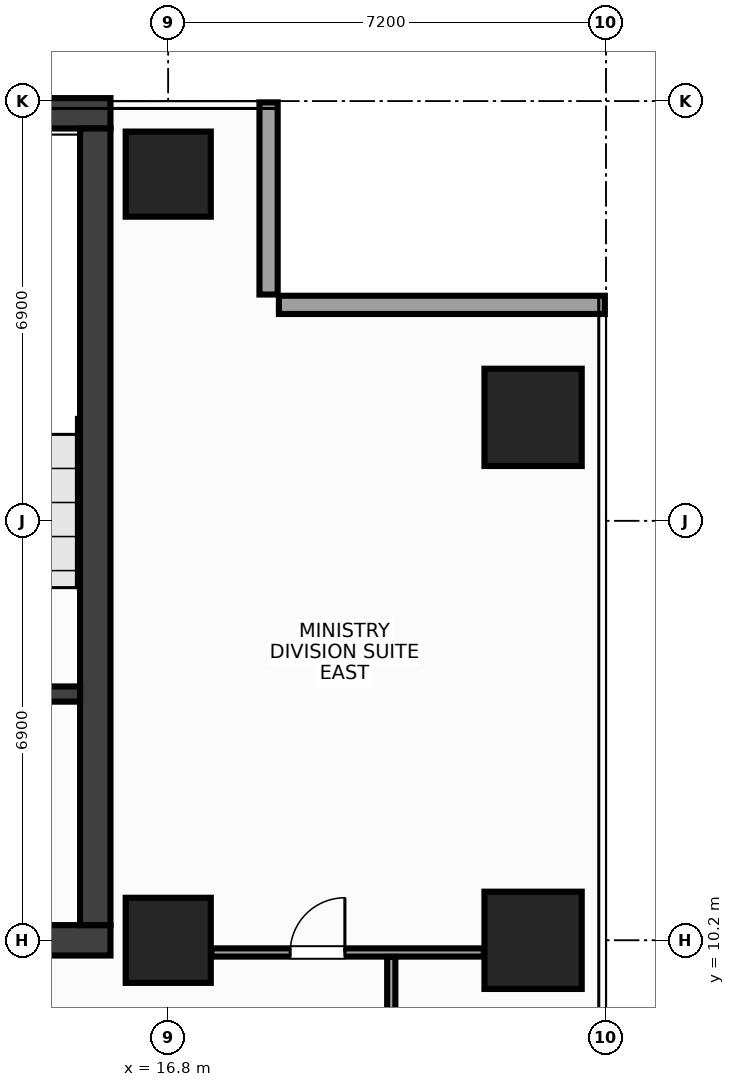
"""IFC4 building model, lengths in metres.
Left out: names, types, materials, properties, quantities, classifications, styles, units other than length and angle.
Written with IfcOpenShell. Run it as: python <this file> out.ifc"""

import sys

from ifc_helpers import new_model, si_unit, direction, frame, frame_2d, origin, origin_2d, place, context, subcontext, project, spatial, rectangle, extrude, source, transform, mapped, element, fill, save


model = new_model("IFC4")
c1 = context("Model", 3, precision=1e-05, world=origin(), true_north=direction((0.0, 1.0)))
c2 = subcontext(c1, "Body", "Model", "MODEL_VIEW")
j1 = project(units=[si_unit("LENGTHUNIT", "METRE"), si_unit("PLANEANGLEUNIT", "RADIAN")], contexts=[c1])
p1 = place(None, origin())
s1 = spatial("IfcSite", under=j1, at=p1, CompositionType="ELEMENT")
p2 = place(p1, origin())
s2 = spatial("IfcBuilding", under=s1, at=p2, CompositionType="ELEMENT")
p3 = place(p2, frame((0.0, 0.0, 196.4)))
s3 = spatial("IfcBuildingStorey", under=s2, at=p3, CompositionType="ELEMENT", Elevation=196.4)
m1 = source(origin(), c2, "Body", "SweptSolid", [
    extrude(rectangle(XDim=31.7, YDim=0.5, at=frame_2d((15.85, 0.0))), origin(), (0.0, 0.0, 1.0), 3.6),
])
p4 = place(p3, frame((-15.85, 23.8, 0.0), z_axis=(0.0, 0.0, 1.0), x_axis=(1.0, 0.0, 0.0)))
e1 = element("IfcWall", 1, at=p4, inside=s3, PredefinedType="SHEAR", context=c2, shape_type="MappedRepresentation", body=[
    mapped(m1, transform((0.0, 0.0, 0.0), x_axis=(1.0, 0.0, 0.0), y_axis=(0.0, 1.0, 0.0), z_axis=(0.0, 0.0, 1.0), scale=1.0)),
])
p5 = place(p3, frame((-15.85, 10.2, 0.0), z_axis=(0.0, 0.0, 1.0), x_axis=(1.0, 0.0, 0.0)))
e2 = element("IfcWall", 2, at=p5, inside=s3, PredefinedType="SHEAR", context=c2, shape_type="MappedRepresentation", body=[
    mapped(m1, transform((0.0, 0.0, 0.0), x_axis=(1.0, 0.0, 0.0), y_axis=(0.0, 1.0, 0.0), z_axis=(0.0, 0.0, 1.0), scale=1.0)),
])
p6 = place(p5, frame((1.7, 0.0, 0.0)))
e3 = element("IfcOpeningElement", 3, at=p6, cuts=e2, PredefinedType="OPENING", context=c2, shape_type="SweptSolid", body=[
    extrude(rectangle(XDim=1.6, YDim=2.15, at=frame_2d((0.8, 1.075))), frame((0.0, 0.262, 0.0), z_axis=(0.0, -1.0, 0.0), x_axis=(1.0, 0.0, 0.0)), (0.0, 0.0, 1.0), 0.524),
])
p7 = place(p5, frame((28.4, 0.0, 0.0)))
e4 = element("IfcOpeningElement", 4, at=p7, cuts=e2, PredefinedType="OPENING", context=c2, shape_type="SweptSolid", body=[
    extrude(rectangle(XDim=1.6, YDim=2.15, at=frame_2d((0.8, 1.075))), frame((0.0, 0.262, 0.0), z_axis=(0.0, -1.0, 0.0), x_axis=(1.0, 0.0, 0.0)), (0.0, 0.0, 1.0), 0.524),
])
p8 = place(p5, frame((15.1, 0.0, 0.0)))
e5 = element("IfcOpeningElement", 5, at=p8, cuts=e2, PredefinedType="OPENING", context=c2, shape_type="SweptSolid", body=[
    extrude(rectangle(XDim=1.5, YDim=2.2, at=frame_2d((0.75, 1.1))), frame((0.0, 0.262, 0.0), z_axis=(0.0, -1.0, 0.0), x_axis=(1.0, 0.0, 0.0)), (0.0, 0.0, 1.0), 0.524),
])
m2 = source(origin(), c2, "Body", "SweptSolid", [
    extrude(rectangle(XDim=13.1, YDim=0.5, at=frame_2d((6.55, 0.0))), origin(), (0.0, 0.0, 1.0), 3.6),
])
p9 = place(p3, frame((15.6, 10.45, 0.0), z_axis=(0.0, 0.0, 1.0), x_axis=(0.0, 1.0, 0.0)))
e6 = element("IfcWall", 6, at=p9, inside=s3, PredefinedType="SHEAR", context=c2, shape_type="MappedRepresentation", body=[
    mapped(m2, transform((0.0, 0.0, 0.0), x_axis=(1.0, 0.0, 0.0), y_axis=(0.0, 1.0, 0.0), z_axis=(0.0, 0.0, 1.0), scale=1.0)),
])
m3 = source(origin(), c2, "Body", "SweptSolid", [
    extrude(rectangle(XDim=3.705, YDim=0.25, at=frame_2d((1.853, 0.0))), origin(), (0.0, 0.0, 1.0), 3.6),
])
p10 = place(p3, frame((11.645, 14.25, 0.0), z_axis=(0.0, 0.0, 1.0), x_axis=(1.0, 0.0, 0.0)))
e7 = element("IfcWall", 7, at=p10, inside=s3, PredefinedType="SHEAR", context=c2, shape_type="MappedRepresentation", body=[
    mapped(m3, transform((0.0, 0.0, 0.0), x_axis=(1.0, 0.0, 0.0), y_axis=(0.0, 1.0, 0.0), z_axis=(0.0, 0.0, 1.0), scale=1.0)),
])
p11 = place(p10, frame((0.95, 0.0, 0.0)))
e8 = element("IfcOpeningElement", 8, at=p11, cuts=e7, PredefinedType="OPENING", context=c2, shape_type="SweptSolid", body=[
    extrude(rectangle(XDim=1.6, YDim=2.15, at=frame_2d((0.8, 1.075))), frame((0.0, 0.137, 0.0), z_axis=(0.0, -1.0, 0.0), x_axis=(1.0, 0.0, 0.0)), (0.0, 0.0, 1.0), 0.274),
])
m4 = source(origin(), c2, "Body", "SweptSolid", [
    extrude(rectangle(XDim=1.4, YDim=1.4, at=origin_2d()), origin(), (0.0, 0.0, 1.0), 3.6),
])
for number, where, z_axis, x_axis in (
    (9, (16.8, 10.2, 0.0), (0.0, 0.0, 1.0), (1.0, 0.0, 0.0)),
    (10, (16.8, 22.8, 0.0), (0.0, 0.0, 1.0), (1.0, 0.0, 0.0)),
):
    element("IfcColumn", number, at=place(p3, frame(where, z_axis=z_axis, x_axis=x_axis)), inside=s3, PredefinedType="COLUMN", context=c2, shape_type="MappedRepresentation", body=[
        mapped(m4, transform((0.0, 0.0, 0.0), x_axis=(1.0, 0.0, 0.0), y_axis=(0.0, 1.0, 0.0), z_axis=(0.0, 0.0, 1.0), scale=1.0)),
    ])
m5 = source(origin(), c2, "Body", "SweptSolid", [
    extrude(rectangle(XDim=1.6, YDim=1.6, at=origin_2d()), origin(), (0.0, 0.0, 1.0), 3.6),
])
for number, where, z_axis, x_axis in (
    (11, (22.8, 10.2, 0.0), (0.0, 0.0, 1.0), (1.0, 0.0, 0.0)),
    (12, (22.8, 18.8, 0.0), (0.0, 0.0, 1.0), (1.0, 0.0, 0.0)),
):
    element("IfcColumn", number, at=place(p3, frame(where, z_axis=z_axis, x_axis=x_axis)), inside=s3, PredefinedType="COLUMN", context=c2, shape_type="MappedRepresentation", body=[
        mapped(m5, transform((0.0, 0.0, 0.0), x_axis=(1.0, 0.0, 0.0), y_axis=(0.0, 1.0, 0.0), z_axis=(0.0, 0.0, 1.0), scale=1.0)),
    ])
m6 = source(origin(), c2, "Body", "SweptSolid", [
    extrude(rectangle(XDim=5.36, YDim=0.3, at=frame_2d((2.68, 0.0))), origin(), (0.0, 0.0, 1.0), 2.76),
])
p12 = place(p3, frame((23.98, 20.65, 0.0), z_axis=(0.0, 0.0, 1.0), x_axis=(-1.0, 0.0, 0.0)))
e13 = element("IfcWall", 13, at=p12, inside=s3, PredefinedType="STANDARD", context=c2, shape_type="MappedRepresentation", body=[
    mapped(m6, transform((0.0, 0.0, 0.0), x_axis=(1.0, 0.0, 0.0), y_axis=(0.0, 1.0, 0.0), z_axis=(0.0, 0.0, 1.0), scale=1.0)),
])
m7 = source(origin(), c2, "Body", "SweptSolid", [
    extrude(rectangle(XDim=3.16, YDim=0.3, at=frame_2d((1.58, 0.0))), origin(), (0.0, 0.0, 1.0), 2.76),
])
p13 = place(p3, frame((18.45, 20.82, 0.0), z_axis=(0.0, 0.0, 1.0), x_axis=(0.0, 1.0, 0.0)))
e14 = element("IfcWall", 14, at=p13, inside=s3, PredefinedType="STANDARD", context=c2, shape_type="MappedRepresentation", body=[
    mapped(m7, transform((0.0, 0.0, 0.0), x_axis=(1.0, 0.0, 0.0), y_axis=(0.0, 1.0, 0.0), z_axis=(0.0, 0.0, 1.0), scale=1.0)),
])
m8 = source(origin(), c2, "Body", "SweptSolid", [
    extrude(rectangle(XDim=4.48, YDim=0.135, at=frame_2d((2.24, 0.0))), origin(), (0.0, 0.0, 1.0), 2.915),
])
p14 = place(p3, frame((17.51, 10.0, 0.0), z_axis=(0.0, 0.0, 1.0), x_axis=(1.0, 0.0, 0.0)))
e15 = element("IfcWall", 15, at=p14, inside=s3, PredefinedType="PARTITIONING", context=c2, shape_type="MappedRepresentation", body=[
    mapped(m8, transform((0.0, 0.0, 0.0), x_axis=(1.0, 0.0, 0.0), y_axis=(0.0, 1.0, 0.0), z_axis=(0.0, 0.0, 1.0), scale=1.0)),
])
p15 = place(p14, frame((1.295, 0.0, 0.0)))
e16 = element("IfcOpeningElement", 16, at=p15, cuts=e15, PredefinedType="OPENING", context=c2, shape_type="SweptSolid", body=[
    extrude(rectangle(XDim=0.9, YDim=2.15, at=frame_2d((0.45, 1.075))), frame((0.0, 0.08, 0.0), z_axis=(0.0, -1.0, 0.0), x_axis=(1.0, 0.0, 0.0)), (0.0, 0.0, 1.0), 0.159),
])
m9 = source(origin(), c2, "Body", "SweptSolid", [
    extrude(rectangle(XDim=2.373, YDim=0.135, at=frame_2d((1.186, 0.0))), origin(), (0.0, 0.0, 1.0), 3.38),
])
p16 = place(p3, frame((20.468, 7.555, 0.0), z_axis=(0.0, 0.0, 1.0), x_axis=(0.0, 1.0, 0.0)))
e17 = element("IfcWall", 17, at=p16, inside=s3, PredefinedType="PARTITIONING", context=c2, shape_type="MappedRepresentation", body=[
    mapped(m9, transform((0.0, 0.0, 0.0), x_axis=(1.0, 0.0, 0.0), y_axis=(0.0, 1.0, 0.0), z_axis=(0.0, 0.0, 1.0), scale=1.0)),
])
m10 = source(origin(), c2, "Body", "SweptSolid", [
    extrude(rectangle(XDim=0.9, YDim=2.15, at=frame_2d((0.45, 1.075))), frame((0.0, 0.025, 0.0), z_axis=(0.0, -1.0, 0.0), x_axis=(1.0, 0.0, 0.0)), (0.0, 0.0, 1.0), 0.05),
])
p17 = place(p15, origin())
e18 = element("IfcDoor", 18, at=p17, inside=s3, OperationType="SINGLE_SWING_RIGHT", PredefinedType="DOOR", context=c2, shape_type="MappedRepresentation", body=[
    mapped(m10, transform((0.0, 0.0, 0.0), x_axis=(1.0, 0.0, 0.0), y_axis=(0.0, 1.0, 0.0), z_axis=(0.0, 0.0, 1.0), scale=1.0)),
])
fill(e16, e18)
save(model, sys.argv[1])
